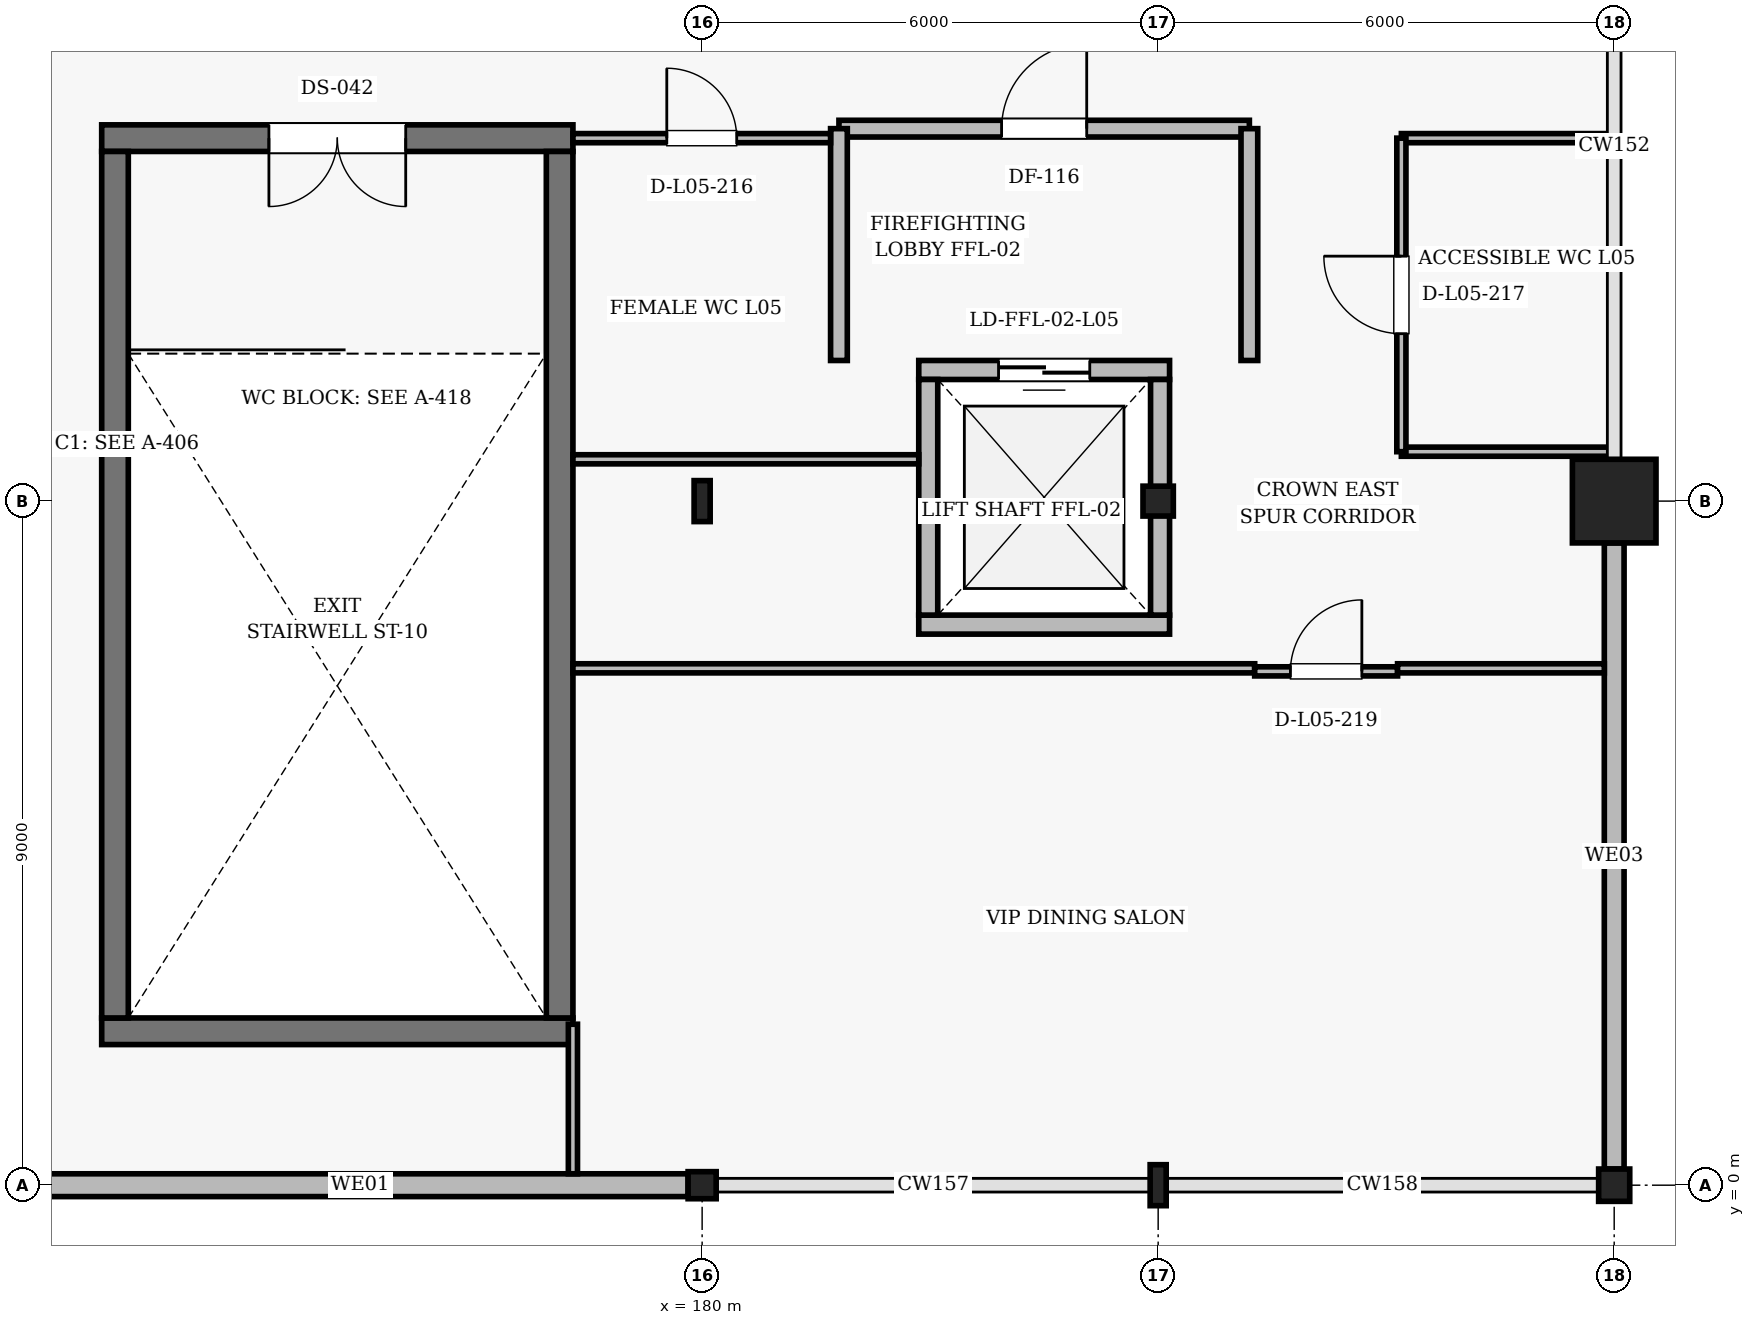
"""IFC4 building model, lengths in metres.
Left out: names, types, materials, properties, quantities, classifications, styles, units other than length and angle.
Written with IfcOpenShell. Run it as: python <this file> out.ifc"""

import sys

from ifc_helpers import new_model, si_unit, direction, frame, frame_2d, origin, origin_2d, place, context, subcontext, project, spatial, rectangle, i_section, extrude, element, fill, save


model = new_model("IFC4")
c1 = context("Model", 3, precision=1e-05, world=origin(), true_north=direction((0.0, 1.0)))
c2 = subcontext(c1, "Body", "Model", "MODEL_VIEW")
j1 = project(units=[si_unit("LENGTHUNIT", "METRE"), si_unit("PLANEANGLEUNIT", "RADIAN")], contexts=[c1])
p1 = place(None, origin())
s1 = spatial("IfcSite", under=j1, at=p1, CompositionType="ELEMENT")
p2 = place(p1, origin())
s2 = spatial("IfcBuilding", under=s1, at=p2, CompositionType="ELEMENT")
p3 = place(p2, frame((0.0, 0.0, 25.2)))
s3 = spatial("IfcBuildingStorey", under=s2, at=p3, CompositionType="ELEMENT", Elevation=25.2)
p4 = place(p3, frame((180.0, 0.0, 0.0), z_axis=(0.0, 0.0, 1.0), x_axis=(1.0, 0.0, 0.0)))
e1 = element("IfcColumn", 1, at=p4, inside=s3, PredefinedType="COLUMN", context=c2, shape_type="SweptSolid", body=[
    extrude(i_section(OverallWidth=0.369, OverallDepth=0.356, WebThickness=0.011, FlangeThickness=0.018, FilletRadius=0.015, at=origin_2d()), origin(), (0.0, 0.0, 1.0), 4.8),
])
for number, where, z_axis, x_axis in (
    (2, (180.0, 9.0, 0.0), (0.0, 0.0, 1.0), (1.0, 0.0, 0.0)),
    (3, (186.0, 0.0, 0.0), (0.0, 0.0, 1.0), (1.0, 0.0, 0.0)),
):
    element("IfcColumn", number, at=place(p3, frame(where, z_axis=z_axis, x_axis=x_axis)), inside=s3, PredefinedType="COLUMN", context=c2, shape_type="SweptSolid", body=[
        extrude(i_section(OverallWidth=0.211, OverallDepth=0.539, WebThickness=0.012, FlangeThickness=0.019, FilletRadius=0.014, at=origin_2d()), origin(), (0.0, 0.0, 1.0), 4.8),
    ])
p5 = place(p3, frame((186.0, 9.0, 0.0), z_axis=(0.0, 0.0, 1.0), x_axis=(1.0, 0.0, 0.0)))
e4 = element("IfcColumn", 4, at=p5, inside=s3, PredefinedType="COLUMN", context=c2, shape_type="SweptSolid", body=[
    extrude(i_section(OverallWidth=0.399, OverallDepth=0.393, WebThickness=0.023, FlangeThickness=0.037, FilletRadius=0.018, at=origin_2d()), origin(), (0.0, 0.0, 1.0), 4.8),
])
p6 = place(p3, frame((192.0, 0.0, 0.0), z_axis=(0.0, 0.0, 1.0), x_axis=(1.0, 0.0, 0.0)))
e5 = element("IfcColumn", 5, at=p6, inside=s3, PredefinedType="COLUMN", context=c2, shape_type="SweptSolid", body=[
    extrude(i_section(OverallWidth=0.409, OverallDepth=0.425, WebThickness=0.031, FlangeThickness=0.049, FilletRadius=0.02, at=origin_2d()), origin(), (0.0, 0.0, 1.0), 4.8),
])
p7 = place(p3, frame((192.0, 9.0, 0.0), z_axis=(0.0, 0.0, 1.0), x_axis=(1.0, 0.0, 0.0)))
e6 = element("IfcColumn", 6, at=p7, inside=s3, PredefinedType="COLUMN", context=c2, shape_type="SweptSolid", body=[
    extrude(rectangle(XDim=1.1, YDim=1.1, at=origin_2d()), origin(), (0.0, 0.0, 1.0), 4.8),
])
p8 = place(p3, frame((192.0, 8.45, 0.0), z_axis=(0.0, 0.0, 1.0), x_axis=(0.0, -1.0, 0.0)))
e7 = element("IfcWall", 7, at=p8, inside=s3, PredefinedType="SOLIDWALL", context=c2, shape_type="SweptSolid", body=[
    extrude(rectangle(XDim=8.238, YDim=0.26, at=frame_2d((4.119, 0.0))), origin(), (0.0, 0.0, 1.0), 4.485),
])
p9 = place(p3, frame((179.815, 0.0, 0.0), z_axis=(0.0, 0.0, 1.0), x_axis=(-1.0, 0.0, 0.0)))
e8 = element("IfcWall", 8, at=p9, inside=s3, PredefinedType="SOLIDWALL", context=c2, shape_type="SweptSolid", body=[
    extrude(rectangle(XDim=8.628, YDim=0.3, at=frame_2d((4.314, 0.0))), origin(), (0.0, 0.0, 1.0), 3.794),
])
p10 = place(p3, frame((172.1, 2.025, 0.0), z_axis=(0.0, 0.0, 1.0), x_axis=(1.0, 0.0, 0.0)))
e9 = element("IfcWall", 9, at=p10, inside=s3, PredefinedType="SHEAR", context=c2, shape_type="SweptSolid", body=[
    extrude(rectangle(XDim=6.2, YDim=0.35, at=frame_2d((3.1, 0.0))), origin(), (0.0, 0.0, 1.0), 4.8),
])
p11 = place(p3, frame((178.3, 13.775, 0.0), z_axis=(0.0, 0.0, 1.0), x_axis=(-1.0, 0.0, 0.0)))
e10 = element("IfcWall", 10, at=p11, inside=s3, PredefinedType="SHEAR", context=c2, shape_type="SweptSolid", body=[
    extrude(rectangle(XDim=6.2, YDim=0.35, at=frame_2d((3.1, 0.0))), origin(), (0.0, 0.0, 1.0), 4.8),
])
p12 = place(p11, frame((2.2, 0.0, 0.0)))
e11 = element("IfcOpeningElement", 11, at=p12, cuts=e10, PredefinedType="OPENING", context=c2, shape_type="SweptSolid", body=[
    extrude(rectangle(XDim=1.8, YDim=2.2, at=frame_2d((0.9, 1.1))), frame((0.0, 0.185, 0.0), z_axis=(0.0, -1.0, 0.0), x_axis=(1.0, 0.0, 0.0)), (0.0, 0.0, 1.0), 0.37),
])
for number, where, z_axis, x_axis in (
    (12, (172.275, 13.6, 0.0), (0.0, 0.0, 1.0), (0.0, -1.0, 0.0)),
    (13, (178.125, 2.2, 0.0), (0.0, 0.0, 1.0), (0.0, 1.0, 0.0)),
):
    element("IfcWall", number, at=place(p3, frame(where, z_axis=z_axis, x_axis=x_axis)), inside=s3, PredefinedType="SHEAR", context=c2, shape_type="SweptSolid", body=[
        extrude(rectangle(XDim=11.4, YDim=0.35, at=frame_2d((5.7, 0.0))), origin(), (0.0, 0.0, 1.0), 4.8),
    ])
p13 = place(p3, frame((182.85, 7.375, 0.0), z_axis=(0.0, 0.0, 1.0), x_axis=(1.0, 0.0, 0.0)))
e14 = element("IfcWall", 14, at=p13, inside=s3, PredefinedType="SOLIDWALL", context=c2, shape_type="SweptSolid", body=[
    extrude(rectangle(XDim=3.3, YDim=0.25, at=frame_2d((1.65, 0.0))), origin(), (0.0, 0.0, 1.0), 4.101),
])
p14 = place(p3, frame((186.15, 10.725, 0.0), z_axis=(0.0, 0.0, 1.0), x_axis=(-1.0, 0.0, 0.0)))
e15 = element("IfcWall", 15, at=p14, inside=s3, PredefinedType="SOLIDWALL", context=c2, shape_type="SweptSolid", body=[
    extrude(rectangle(XDim=3.3, YDim=0.25, at=frame_2d((1.65, 0.0))), origin(), (0.0, 0.0, 1.0), 4.174),
])
p15 = place(p14, frame((1.05, 0.0, 0.0)))
e16 = element("IfcOpeningElement", 16, at=p15, cuts=e15, PredefinedType="OPENING", context=c2, shape_type="SweptSolid", body=[
    extrude(rectangle(XDim=1.2, YDim=2.25, at=frame_2d((0.6, 1.125))), frame((0.0, 0.135, 0.0), z_axis=(0.0, -1.0, 0.0), x_axis=(1.0, 0.0, 0.0)), (0.0, 0.0, 1.0), 0.27),
])
for number, where, z_axis, x_axis in (
    (17, (182.975, 10.6, 0.0), (0.0, 0.0, 1.0), (0.0, -1.0, 0.0)),
    (18, (186.025, 7.5, 0.0), (0.0, 0.0, 1.0), (0.0, 1.0, 0.0)),
):
    element("IfcWall", number, at=place(p3, frame(where, z_axis=z_axis, x_axis=x_axis)), inside=s3, PredefinedType="SOLIDWALL", context=c2, shape_type="SweptSolid", body=[
        extrude(rectangle(XDim=3.1, YDim=0.25, at=frame_2d((1.55, 0.0))), origin(), (0.0, 0.0, 1.0), 4.012),
    ])
p16 = place(p3, frame((181.8, 13.9, 0.0), z_axis=(0.0, 0.0, 1.0), x_axis=(1.0, 0.0, 0.0)))
e19 = element("IfcWall", 19, at=p16, inside=s3, PredefinedType="SOLIDWALL", context=c2, shape_type="SweptSolid", body=[
    extrude(rectangle(XDim=5.4, YDim=0.22, at=frame_2d((2.7, 0.0))), origin(), (0.0, 0.0, 1.0), 4.174),
])
p17 = place(p16, frame((2.14, 0.0, 0.0)))
e20 = element("IfcOpeningElement", 20, at=p17, cuts=e19, PredefinedType="OPENING", context=c2, shape_type="SweptSolid", body=[
    extrude(rectangle(XDim=1.12, YDim=2.2, at=frame_2d((0.56, 1.1))), frame((0.0, 0.12, 0.0), z_axis=(0.0, -1.0, 0.0), x_axis=(1.0, 0.0, 0.0)), (0.0, 0.0, 1.0), 0.24),
])
for number, where, z_axis, x_axis in (
    (21, (181.8, 10.85, 0.0), (0.0, 0.0, 1.0), (0.0, 1.0, 0.0)),
    (22, (187.2, 10.85, 0.0), (0.0, 0.0, 1.0), (0.0, 1.0, 0.0)),
):
    element("IfcWall", number, at=place(p3, frame(where, z_axis=z_axis, x_axis=x_axis)), inside=s3, PredefinedType="SOLIDWALL", context=c2, shape_type="SweptSolid", body=[
        extrude(rectangle(XDim=3.05, YDim=0.22, at=frame_2d((1.525, 0.0))), origin(), (0.0, 0.0, 1.0), 4.6),
    ])
p18 = place(p3, frame((178.3, 13.775, 0.0), z_axis=(0.0, 0.0, 1.0), x_axis=(1.0, 0.0, 0.0)))
e23 = element("IfcWall", 23, at=p18, inside=s3, PredefinedType="PARTITIONING", context=c2, shape_type="SweptSolid", body=[
    extrude(rectangle(XDim=3.39, YDim=0.12, at=frame_2d((1.695, 0.0))), origin(), (0.0, 0.0, 1.0), 4.012),
])
p19 = place(p18, frame((1.235, 0.0, 0.0)))
e24 = element("IfcOpeningElement", 24, at=p19, cuts=e23, PredefinedType="OPENING", context=c2, shape_type="SweptSolid", body=[
    extrude(rectangle(XDim=0.92, YDim=2.12, at=frame_2d((0.46, 1.06))), frame((0.0, 0.07, 0.0), z_axis=(0.0, -1.0, 0.0), x_axis=(1.0, 0.0, 0.0)), (0.0, 0.0, 1.0), 0.14),
])
p20 = place(p3, frame((182.85, 9.55, 0.0), z_axis=(0.0, 0.0, 1.0), x_axis=(-1.0, 0.0, 0.0)))
e25 = element("IfcWall", 25, at=p20, inside=s3, PredefinedType="PARTITIONING", context=c2, shape_type="SweptSolid", body=[
    extrude(rectangle(XDim=4.55, YDim=0.12, at=frame_2d((2.275, 0.0))), origin(), (0.0, 0.0, 1.0), 4.012),
])
for number, where, z_axis, x_axis in (
    (26, (189.2, 13.775, 0.0), (0.0, 0.0, 1.0), (1.0, 0.0, 0.0)),
    (27, (191.988, 9.65, 0.0), (0.0, 0.0, 1.0), (-1.0, 0.0, 0.0)),
):
    element("IfcWall", number, at=place(p3, frame(where, z_axis=z_axis, x_axis=x_axis)), inside=s3, PredefinedType="PARTITIONING", context=c2, shape_type="SweptSolid", body=[
        extrude(rectangle(XDim=2.788, YDim=0.12, at=frame_2d((1.394, 0.0))), origin(), (0.0, 0.0, 1.0), 4.246),
    ])
p21 = place(p3, frame((189.2, 9.65, 0.0), z_axis=(0.0, 0.0, 1.0), x_axis=(0.0, 1.0, 0.0)))
e28 = element("IfcWall", 28, at=p21, inside=s3, PredefinedType="PARTITIONING", context=c2, shape_type="SweptSolid", body=[
    extrude(rectangle(XDim=4.125, YDim=0.12, at=frame_2d((2.062, 0.0))), origin(), (0.0, 0.0, 1.0), 4.6),
])
p22 = place(p21, frame((1.552, 0.0, 0.0)))
e29 = element("IfcOpeningElement", 29, at=p22, cuts=e28, PredefinedType="OPENING", context=c2, shape_type="SweptSolid", body=[
    extrude(rectangle(XDim=1.02, YDim=2.16, at=frame_2d((0.51, 1.08))), frame((0.0, 0.07, 0.0), z_axis=(0.0, -1.0, 0.0), x_axis=(1.0, 0.0, 0.0)), (0.0, 0.0, 1.0), 0.14),
])
p23 = place(p3, frame((178.3, 6.8, 0.0), z_axis=(0.0, 0.0, 1.0), x_axis=(1.0, 0.0, 0.0)))
e30 = element("IfcWall", 30, at=p23, inside=s3, PredefinedType="PARTITIONING", context=c2, shape_type="SweptSolid", body=[
    extrude(rectangle(XDim=8.97, YDim=0.12, at=frame_2d((4.485, 0.0))), origin(), (0.0, 0.0, 1.0), 4.101),
])
p24 = place(p3, frame((187.27, 6.76, 0.0), z_axis=(0.0, 0.0, 1.0), x_axis=(1.0, 0.0, 0.0)))
e31 = element("IfcWall", 31, at=p24, inside=s3, PredefinedType="PARTITIONING", context=c2, shape_type="SweptSolid", body=[
    extrude(rectangle(XDim=1.88, YDim=0.12, at=frame_2d((0.94, 0.0))), origin(), (0.0, 0.0, 1.0), 4.6),
])
p25 = place(p24, frame((0.47, 0.0, 0.0)))
e32 = element("IfcOpeningElement", 32, at=p25, cuts=e31, PredefinedType="OPENING", context=c2, shape_type="SweptSolid", body=[
    extrude(rectangle(XDim=0.94, YDim=2.15, at=frame_2d((0.47, 1.075))), frame((0.0, 0.07, 0.0), z_axis=(0.0, -1.0, 0.0), x_axis=(1.0, 0.0, 0.0)), (0.0, 0.0, 1.0), 0.14),
])
p26 = place(p3, frame((189.15, 6.8, 0.0), z_axis=(0.0, 0.0, 1.0), x_axis=(1.0, 0.0, 0.0)))
e33 = element("IfcWall", 33, at=p26, inside=s3, PredefinedType="PARTITIONING", context=c2, shape_type="SweptSolid", body=[
    extrude(rectangle(XDim=2.72, YDim=0.12, at=frame_2d((1.36, 0.0))), origin(), (0.0, 0.0, 1.0), 4.485),
])
p27 = place(p3, frame((178.3, 0.15, 0.0), z_axis=(0.0, 0.0, 1.0), x_axis=(0.0, 1.0, 0.0)))
e34 = element("IfcWall", 34, at=p27, inside=s3, PredefinedType="PARTITIONING", context=c2, shape_type="SweptSolid", body=[
    extrude(rectangle(XDim=1.968, YDim=0.12, at=frame_2d((0.984, 0.0))), origin(), (0.0, 0.0, 1.0), 3.794),
])
p28 = place(p12, origin())
e35 = element("IfcDoor", 35, at=p28, inside=s3, OperationType="DOUBLE_DOOR_SINGLE_SWING", PredefinedType="DOOR", context=c2, shape_type="SweptSolid", body=[
    extrude(rectangle(XDim=1.8, YDim=2.2, at=frame_2d((0.9, 1.1))), frame((0.0, 0.025, 0.0), z_axis=(0.0, -1.0, 0.0), x_axis=(1.0, 0.0, 0.0)), (0.0, 0.0, 1.0), 0.05),
])
fill(e11, e35)
p29 = place(p15, origin())
e36 = element("IfcDoor", 36, at=p29, inside=s3, OperationType="DOUBLE_DOOR_SLIDING", PredefinedType="DOOR", context=c2, shape_type="SweptSolid", body=[
    extrude(rectangle(XDim=1.2, YDim=2.25, at=frame_2d((0.6, 1.125))), frame((0.0, 0.025, 0.0), z_axis=(0.0, -1.0, 0.0), x_axis=(1.0, 0.0, 0.0)), (0.0, 0.0, 1.0), 0.05),
])
fill(e16, e36)
p30 = place(p17, origin())
e37 = element("IfcDoor", 37, at=p30, inside=s3, OperationType="SINGLE_SWING_RIGHT", PredefinedType="DOOR", context=c2, shape_type="SweptSolid", body=[
    extrude(rectangle(XDim=1.12, YDim=2.2, at=frame_2d((0.56, 1.1))), frame((0.0, 0.025, 0.0), z_axis=(0.0, -1.0, 0.0), x_axis=(1.0, 0.0, 0.0)), (0.0, 0.0, 1.0), 0.05),
])
fill(e20, e37)
p31 = place(p19, origin())
e38 = element("IfcDoor", 38, at=p31, inside=s3, OperationType="SINGLE_SWING_LEFT", PredefinedType="DOOR", context=c2, shape_type="SweptSolid", body=[
    extrude(rectangle(XDim=0.92, YDim=2.12, at=frame_2d((0.46, 1.06))), frame((0.0, 0.025, 0.0), z_axis=(0.0, -1.0, 0.0), x_axis=(1.0, 0.0, 0.0)), (0.0, 0.0, 1.0), 0.05),
])
fill(e24, e38)
p32 = place(p22, origin())
e39 = element("IfcDoor", 39, at=p32, inside=s3, OperationType="SINGLE_SWING_RIGHT", PredefinedType="DOOR", context=c2, shape_type="SweptSolid", body=[
    extrude(rectangle(XDim=1.02, YDim=2.16, at=frame_2d((0.51, 1.08))), frame((0.0, 0.025, 0.0), z_axis=(0.0, -1.0, 0.0), x_axis=(1.0, 0.0, 0.0)), (0.0, 0.0, 1.0), 0.05),
])
fill(e29, e39)
p33 = place(p25, origin())
e40 = element("IfcDoor", 40, at=p33, inside=s3, OperationType="SINGLE_SWING_RIGHT", PredefinedType="DOOR", context=c2, shape_type="SweptSolid", body=[
    extrude(rectangle(XDim=0.94, YDim=2.15, at=frame_2d((0.47, 1.075))), frame((0.0, 0.025, 0.0), z_axis=(0.0, -1.0, 0.0), x_axis=(1.0, 0.0, 0.0)), (0.0, 0.0, 1.0), 0.05),
])
fill(e32, e40)
save(model, sys.argv[1])
